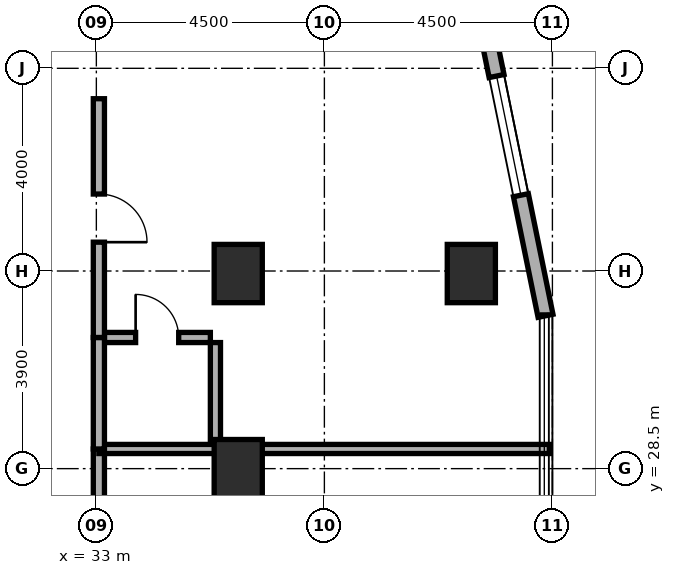
"""IFC4 building model, lengths in metres.
Left out: names, types, materials, properties, quantities, classifications, styles, units other than length and angle.
Written with IfcOpenShell. Run it as: python <this file> out.ifc"""

import sys

from ifc_helpers import new_model, si_unit, direction, frame, frame_2d, origin, origin_2d, place, context, subcontext, project, spatial, rectangle, extrude, element, fill, save


model = new_model("IFC4")
c1 = context("Model", 3, precision=1e-05, world=origin(), true_north=direction((0.0, 1.0)))
c2 = subcontext(c1, "Body", "Model", "MODEL_VIEW")
j1 = project(units=[si_unit("LENGTHUNIT", "METRE"), si_unit("PLANEANGLEUNIT", "RADIAN")], contexts=[c1])
p1 = place(None, origin())
s1 = spatial("IfcSite", under=j1, at=p1, CompositionType="ELEMENT")
p2 = place(p1, origin())
s2 = spatial("IfcBuilding", under=s1, at=p2, CompositionType="ELEMENT")
p3 = place(p2, frame((0.0, 0.0, 73.0)))
s3 = spatial("IfcBuildingStorey", under=s2, at=p3, CompositionType="ELEMENT", Elevation=73.0)
for number, where, z_axis, x_axis in (
    (1, (35.8, 28.5, 0.0), (0.0, 0.0, 1.0), (1.0, 0.0, 0.0)),
    (2, (35.8, 32.35, 0.0), (0.0, 0.0, 1.0), (1.0, 0.0, 0.0)),
    (3, (40.4, 32.35, 0.0), (0.0, 0.0, 1.0), (1.0, 0.0, 0.0)),
):
    element("IfcColumn", number, at=place(p3, frame(where, z_axis=z_axis, x_axis=x_axis)), inside=s3, PredefinedType="COLUMN", context=c2, shape_type="SweptSolid", body=[
        extrude(rectangle(XDim=0.95, YDim=1.15, at=origin_2d()), origin(), (0.0, 0.0, 1.0), 3.5),
    ])
p4 = place(p3, frame((41.864, 31.516, 0.0), z_axis=(0.0, 0.0, 1.0), x_axis=(-0.199990901713, 0.979797754249, 0.0)))
e4 = element("IfcWall", 4, at=p4, inside=s3, PredefinedType="STANDARD", context=c2, shape_type="SweptSolid", body=[
    extrude(rectangle(XDim=10.065, YDim=0.3, at=frame_2d((5.033, 0.0))), origin(), (0.0, 0.0, 1.0), 3.22),
])
p5 = place(p4, frame((2.429, 0.0, 0.8)))
e5 = element("IfcOpeningElement", 5, at=p5, cuts=e4, PredefinedType="OPENING", context=c2, shape_type="SweptSolid", body=[
    extrude(rectangle(XDim=2.4, YDim=1.6, at=frame_2d((1.2, 0.8))), frame((0.0, 0.16, 0.0), z_axis=(0.0, -1.0, 0.0), x_axis=(1.0, 0.0, 0.0)), (0.0, 0.0, 1.0), 0.32),
])
p6 = place(p4, frame((7.887, 0.0, 0.85)))
e6 = element("IfcOpeningElement", 6, at=p6, cuts=e4, PredefinedType="OPENING", context=c2, shape_type="SweptSolid", body=[
    extrude(rectangle(XDim=1.8, YDim=1.5, at=frame_2d((0.9, 0.75))), frame((0.0, 0.16, 0.0), z_axis=(0.0, -1.0, 0.0), x_axis=(1.0, 0.0, 0.0)), (0.0, 0.0, 1.0), 0.32),
])
p7 = place(p3, frame((33.05, 23.744, 0.0), z_axis=(0.0, 0.0, 1.0), x_axis=(0.0, 1.0, 0.0)))
e7 = element("IfcWall", 7, at=p7, inside=s3, PredefinedType="SOLIDWALL", context=c2, shape_type="SweptSolid", body=[
    extrude(rectangle(XDim=5.144, YDim=0.22, at=frame_2d((2.572, 0.0))), origin(), (0.0, 0.0, 1.0), 2.495),
])
p8 = place(p7, frame((2.097, 0.0, 0.0)))
e8 = element("IfcOpeningElement", 8, at=p8, cuts=e7, PredefinedType="OPENING", context=c2, shape_type="SweptSolid", body=[
    extrude(rectangle(XDim=0.95, YDim=2.1, at=frame_2d((0.475, 1.05))), frame((0.0, 0.12, 0.0), z_axis=(0.0, -1.0, 0.0), x_axis=(1.0, 0.0, 0.0)), (0.0, 0.0, 1.0), 0.24),
])
p9 = place(p3, frame((33.05, 28.888, 0.0), z_axis=(0.0, 0.0, 1.0), x_axis=(1.0, 0.0, 0.0)))
e9 = element("IfcWall", 9, at=p9, inside=s3, PredefinedType="SOLIDWALL", context=c2, shape_type="SweptSolid", body=[
    extrude(rectangle(XDim=8.89, YDim=0.18, at=frame_2d((4.445, 0.0))), origin(), (0.0, 0.0, 1.0), 2.745),
])
p10 = place(p3, frame((33.15, 31.088, 0.0), z_axis=(0.0, 0.0, 1.0), x_axis=(1.0, 0.0, 0.0)))
e10 = element("IfcWall", 10, at=p10, inside=s3, PredefinedType="PLUMBINGWALL", context=c2, shape_type="SweptSolid", body=[
    extrude(rectangle(XDim=2.1, YDim=0.2, at=frame_2d((1.05, 0.0))), origin(), (0.0, 0.0, 1.0), 3.22),
])
p11 = place(p10, frame((0.625, 0.0, 0.0)))
e11 = element("IfcOpeningElement", 11, at=p11, cuts=e10, PredefinedType="OPENING", context=c2, shape_type="SweptSolid", body=[
    extrude(rectangle(XDim=0.85, YDim=2.1, at=frame_2d((0.425, 1.05))), frame((0.0, 0.11, 0.0), z_axis=(0.0, -1.0, 0.0), x_axis=(1.0, 0.0, 0.0)), (0.0, 0.0, 1.0), 0.22),
])
p12 = place(p3, frame((35.35, 28.988, 0.0), z_axis=(0.0, 0.0, 1.0), x_axis=(0.0, 1.0, 0.0)))
e12 = element("IfcWall", 12, at=p12, inside=s3, PredefinedType="PLUMBINGWALL", context=c2, shape_type="SweptSolid", body=[
    extrude(rectangle(XDim=2.0, YDim=0.2, at=frame_2d((1.0, 0.0))), origin(), (0.0, 0.0, 1.0), 3.22),
])
p13 = place(p3, frame((33.05, 28.888, 0.0), z_axis=(0.0, 0.0, 1.0), x_axis=(0.0, 1.0, 0.0)))
e13 = element("IfcWall", 13, at=p13, inside=s3, PredefinedType="SOLIDWALL", context=c2, shape_type="SweptSolid", body=[
    extrude(rectangle(XDim=2.2, YDim=0.22, at=frame_2d((1.1, 0.0))), origin(), (0.0, 0.0, 1.0), 3.22),
])
p14 = place(p3, frame((33.05, 31.088, 0.0), z_axis=(0.0, 0.0, 1.0), x_axis=(0.0, 1.0, 0.0)))
e14 = element("IfcWall", 14, at=p14, inside=s3, PredefinedType="SOLIDWALL", context=c2, shape_type="SweptSolid", body=[
    extrude(rectangle(XDim=4.712, YDim=0.22, at=frame_2d((2.356, 0.0))), origin(), (0.0, 0.0, 1.0), 2.495),
])
p15 = place(p14, frame((1.881, 0.0, 0.0)))
e15 = element("IfcOpeningElement", 15, at=p15, cuts=e14, PredefinedType="OPENING", context=c2, shape_type="SweptSolid", body=[
    extrude(rectangle(XDim=0.95, YDim=2.1, at=frame_2d((0.475, 1.05))), frame((0.0, 0.12, 0.0), z_axis=(0.0, -1.0, 0.0), x_axis=(1.0, 0.0, 0.0)), (0.0, 0.0, 1.0), 0.24),
])
p16 = place(p5, origin())
e16 = element("IfcWindow", 16, at=p16, inside=s3, PartitioningType="SINGLE_PANEL", PredefinedType="WINDOW", context=c2, shape_type="SweptSolid", body=[
    extrude(rectangle(XDim=2.4, YDim=1.6, at=frame_2d((1.2, 0.8))), frame((0.0, 0.03, 0.0), z_axis=(0.0, -1.0, 0.0), x_axis=(1.0, 0.0, 0.0)), (0.0, 0.0, 1.0), 0.06),
])
fill(e5, e16)
p17 = place(p11, origin())
e17 = element("IfcDoor", 17, at=p17, inside=s3, OperationType="SINGLE_SWING_LEFT", PredefinedType="DOOR", context=c2, shape_type="SweptSolid", body=[
    extrude(rectangle(XDim=0.85, YDim=2.1, at=frame_2d((0.425, 1.05))), frame((0.0, 0.025, 0.0), z_axis=(0.0, -1.0, 0.0), x_axis=(1.0, 0.0, 0.0)), (0.0, 0.0, 1.0), 0.05),
])
fill(e11, e17)
p18 = place(p15, frame((0.95, 0.0, 0.0), z_axis=(0.0, 0.0, 1.0), x_axis=(-1.0, 0.0, 0.0)))
e18 = element("IfcDoor", 18, at=p18, inside=s3, OperationType="SINGLE_SWING_RIGHT", PredefinedType="DOOR", context=c2, shape_type="SweptSolid", body=[
    extrude(rectangle(XDim=0.95, YDim=2.1, at=frame_2d((0.475, 1.05))), frame((0.0, 0.025, 0.0), z_axis=(0.0, -1.0, 0.0), x_axis=(1.0, 0.0, 0.0)), (0.0, 0.0, 1.0), 0.05),
])
fill(e15, e18)
save(model, sys.argv[1])
